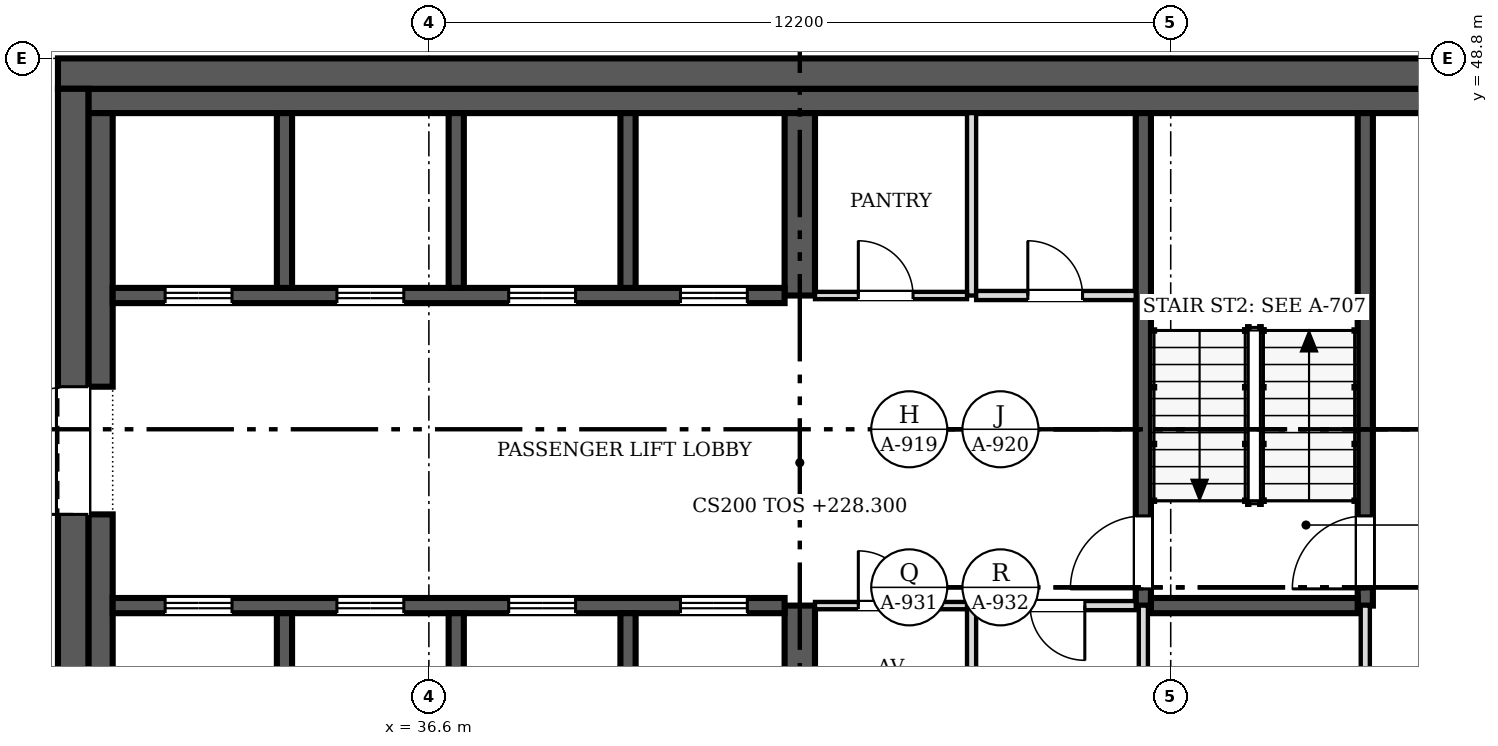
"""IFC4 building model, lengths in metres.
Left out: names, types, materials, properties, quantities, classifications, styles, units other than length and angle.
Written with IfcOpenShell. Run it as: python <this file> out.ifc"""

import sys

from ifc_helpers import new_model, si_unit, direction, frame, frame_2d, origin, place, context, subcontext, project, spatial, rectangle, extrude, source, transform, mapped, element, fill, save


model = new_model("IFC4")
c1 = context("Model", 3, precision=1e-05, world=origin(), true_north=direction((0.0, 1.0)))
c2 = subcontext(c1, "Body", "Model", "MODEL_VIEW")
j1 = project(units=[si_unit("LENGTHUNIT", "METRE"), si_unit("PLANEANGLEUNIT", "RADIAN")], contexts=[c1])
p1 = place(None, origin())
s1 = spatial("IfcSite", under=j1, at=p1, CompositionType="ELEMENT")
p2 = place(p1, origin())
s2 = spatial("IfcBuilding", under=s1, at=p2, CompositionType="ELEMENT")
p3 = place(p2, frame((0.0, 0.0, 228.3)))
s3 = spatial("IfcBuildingStorey", under=s2, at=p3, CompositionType="ELEMENT", Elevation=228.3)
p4 = place(p3, frame((30.75, 24.9, 0.0), z_axis=(0.0, 0.0, 1.0), x_axis=(0.0, 1.0, 0.0)))
e1 = element("IfcWall", 1, at=p4, inside=s3, PredefinedType="SHEAR", context=c2, shape_type="SweptSolid", body=[
    extrude(rectangle(XDim=23.4, YDim=0.5, at=frame_2d((11.7, 0.0))), origin(), (0.0, 0.0, 1.0), 3.8),
])
m1 = source(origin(), c2, "Body", "SweptSolid", [
    extrude(rectangle(XDim=2.1, YDim=2.4, at=frame_2d((1.05, 1.2))), frame((0.0, 0.26, 0.0), z_axis=(0.0, -1.0, 0.0), x_axis=(1.0, 0.0, 0.0)), (0.0, 0.0, 1.0), 0.52),
])
p5 = place(p4, frame((4.9, 0.0, 0.0)))
e2 = element("IfcOpeningElement", 2, at=p5, cuts=e1, PredefinedType="OPENING", context=c2, shape_type="MappedRepresentation", body=[
    mapped(m1, transform((0.0, 0.0, 0.0), scale=1.0)),
])
p6 = place(p4, frame((16.4, 0.0, 0.0)))
e3 = element("IfcOpeningElement", 3, at=p6, cuts=e1, PredefinedType="OPENING", context=c2, shape_type="MappedRepresentation", body=[
    mapped(m1, transform((0.0, 0.0, 0.0), scale=1.0)),
])
p7 = place(p3, frame((30.5, 48.55, 0.0), z_axis=(0.0, 0.0, 1.0), x_axis=(1.0, 0.0, 0.0)))
e4 = element("IfcWall", 4, at=p7, inside=s3, PredefinedType="SHEAR", context=c2, shape_type="SweptSolid", body=[
    extrude(rectangle(XDim=24.4, YDim=0.5, at=frame_2d((12.2, 0.0))), origin(), (0.0, 0.0, 1.0), 3.8),
])
p8 = place(p3, frame((31.0, 48.1, 0.0), z_axis=(0.0, 0.0, 1.0), x_axis=(1.0, 0.0, 0.0)))
e5 = element("IfcWall", 5, at=p8, inside=s3, PredefinedType="SOLIDWALL", context=c2, shape_type="SweptSolid", body=[
    extrude(rectangle(XDim=23.4, YDim=0.4, at=frame_2d((11.7, 0.0))), origin(), (0.0, 0.0, 1.0), 3.8),
])
p9 = place(p3, frame((31.2, 31.9, 0.0), z_axis=(0.0, 0.0, 1.0), x_axis=(0.0, 1.0, 0.0)))
e6 = element("IfcWall", 6, at=p9, inside=s3, PredefinedType="SOLIDWALL", context=c2, shape_type="SweptSolid", body=[
    extrude(rectangle(XDim=9.4, YDim=0.4, at=frame_2d((4.7, 0.0))), origin(), (0.0, 0.0, 1.0), 3.8),
])
p10 = place(p3, frame((31.2, 43.4, 0.0), z_axis=(0.0, 0.0, 1.0), x_axis=(0.0, 1.0, 0.0)))
e7 = element("IfcWall", 7, at=p10, inside=s3, PredefinedType="SOLIDWALL", context=c2, shape_type="SweptSolid", body=[
    extrude(rectangle(XDim=4.5, YDim=0.4, at=frame_2d((2.25, 0.0))), origin(), (0.0, 0.0, 1.0), 3.8),
])
p11 = place(p3, frame((42.7, 36.85, 0.0), z_axis=(0.0, 0.0, 1.0), x_axis=(0.0, 1.0, 0.0)))
e8 = element("IfcWall", 8, at=p11, inside=s3, PredefinedType="SHEAR", context=c2, shape_type="SweptSolid", body=[
    extrude(rectangle(XDim=2.95, YDim=0.5, at=frame_2d((1.475, 0.0))), origin(), (0.0, 0.0, 1.0), 3.8),
])
p12 = place(p3, frame((42.7, 44.9, 0.0), z_axis=(0.0, 0.0, 1.0), x_axis=(0.0, 1.0, 0.0)))
e9 = element("IfcWall", 9, at=p12, inside=s3, PredefinedType="SHEAR", context=c2, shape_type="SweptSolid", body=[
    extrude(rectangle(XDim=3.0, YDim=0.5, at=frame_2d((1.5, 0.0))), origin(), (0.0, 0.0, 1.0), 3.8),
])
p13 = place(p3, frame((31.4, 39.8, 0.0), z_axis=(0.0, 0.0, 1.0), x_axis=(1.0, 0.0, 0.0)))
e10 = element("IfcWall", 10, at=p13, inside=s3, PredefinedType="SOLIDWALL", context=c2, shape_type="SweptSolid", body=[
    extrude(rectangle(XDim=11.05, YDim=0.25, at=frame_2d((5.525, 0.0))), origin(), (0.0, 0.0, 1.0), 3.8),
])
m2 = source(origin(), c2, "Body", "SweptSolid", [
    extrude(rectangle(XDim=1.1, YDim=2.1, at=frame_2d((0.55, 1.05))), frame((0.0, 0.135, 0.0), z_axis=(0.0, -1.0, 0.0), x_axis=(1.0, 0.0, 0.0)), (0.0, 0.0, 1.0), 0.27),
])
p14 = place(p13, frame((0.863, 0.0, 0.0)))
e11 = element("IfcOpeningElement", 11, at=p14, cuts=e10, PredefinedType="OPENING", context=c2, shape_type="MappedRepresentation", body=[
    mapped(m2, transform((0.0, 0.0, 0.0), scale=1.0)),
])
p15 = place(p13, frame((3.688, 0.0, 0.0)))
e12 = element("IfcOpeningElement", 12, at=p15, cuts=e10, PredefinedType="OPENING", context=c2, shape_type="MappedRepresentation", body=[
    mapped(m2, transform((0.0, 0.0, 0.0), scale=1.0)),
])
p16 = place(p13, frame((6.512, 0.0, 0.0)))
e13 = element("IfcOpeningElement", 13, at=p16, cuts=e10, PredefinedType="OPENING", context=c2, shape_type="MappedRepresentation", body=[
    mapped(m2, transform((0.0, 0.0, 0.0), scale=1.0)),
])
p17 = place(p13, frame((9.337, 0.0, 0.0)))
e14 = element("IfcOpeningElement", 14, at=p17, cuts=e10, PredefinedType="OPENING", context=c2, shape_type="MappedRepresentation", body=[
    mapped(m2, transform((0.0, 0.0, 0.0), scale=1.0)),
])
p18 = place(p3, frame((42.45, 44.9, 0.0), z_axis=(0.0, 0.0, 1.0), x_axis=(-1.0, 0.0, 0.0)))
e15 = element("IfcWall", 15, at=p18, inside=s3, PredefinedType="SOLIDWALL", context=c2, shape_type="SweptSolid", body=[
    extrude(rectangle(XDim=11.05, YDim=0.25, at=frame_2d((5.525, 0.0))), origin(), (0.0, 0.0, 1.0), 3.8),
])
p19 = place(p18, frame((9.087, 0.0, 0.0)))
e16 = element("IfcOpeningElement", 16, at=p19, cuts=e15, PredefinedType="OPENING", context=c2, shape_type="MappedRepresentation", body=[
    mapped(m2, transform((0.0, 0.0, 0.0), scale=1.0)),
])
p20 = place(p18, frame((6.262, 0.0, 0.0)))
e17 = element("IfcOpeningElement", 17, at=p20, cuts=e15, PredefinedType="OPENING", context=c2, shape_type="MappedRepresentation", body=[
    mapped(m2, transform((0.0, 0.0, 0.0), scale=1.0)),
])
p21 = place(p18, frame((3.438, 0.0, 0.0)))
e18 = element("IfcOpeningElement", 18, at=p21, cuts=e15, PredefinedType="OPENING", context=c2, shape_type="MappedRepresentation", body=[
    mapped(m2, transform((0.0, 0.0, 0.0), scale=1.0)),
])
p22 = place(p18, frame((0.613, 0.0, 0.0)))
e19 = element("IfcOpeningElement", 19, at=p22, cuts=e15, PredefinedType="OPENING", context=c2, shape_type="MappedRepresentation", body=[
    mapped(m2, transform((0.0, 0.0, 0.0), scale=1.0)),
])
p23 = place(p3, frame((48.35, 47.9, 0.0), z_axis=(0.0, 0.0, 1.0), x_axis=(0.0, -1.0, 0.0)))
e20 = element("IfcWall", 20, at=p23, inside=s3, PredefinedType="SOLIDWALL", context=c2, shape_type="SweptSolid", body=[
    extrude(rectangle(XDim=8.1, YDim=0.25, at=frame_2d((4.05, 0.0))), origin(), (0.0, 0.0, 1.0), 3.8),
])
m3 = source(origin(), c2, "Body", "SweptSolid", [
    extrude(rectangle(XDim=1.2, YDim=2.1, at=frame_2d((0.6, 1.05))), frame((0.0, 0.135, 0.0), z_axis=(0.0, -1.0, 0.0), x_axis=(1.0, 0.0, 0.0)), (0.0, 0.0, 1.0), 0.27),
])
p24 = place(p23, frame((6.625, 0.0, 0.0)))
e21 = element("IfcOpeningElement", 21, at=p24, cuts=e20, PredefinedType="OPENING", context=c2, shape_type="MappedRepresentation", body=[
    mapped(m3, transform((0.0, 0.0, 0.0), scale=1.0)),
])
p25 = place(p3, frame((52.0, 39.8, 0.0), z_axis=(0.0, 0.0, 1.0), x_axis=(0.0, 1.0, 0.0)))
e22 = element("IfcWall", 22, at=p25, inside=s3, PredefinedType="SOLIDWALL", context=c2, shape_type="SweptSolid", body=[
    extrude(rectangle(XDim=8.1, YDim=0.25, at=frame_2d((4.05, 0.0))), origin(), (0.0, 0.0, 1.0), 3.8),
])
p26 = place(p25, frame((0.275, 0.0, 0.0)))
e23 = element("IfcOpeningElement", 23, at=p26, cuts=e22, PredefinedType="OPENING", context=c2, shape_type="MappedRepresentation", body=[
    mapped(m3, transform((0.0, 0.0, 0.0), scale=1.0)),
])
p27 = place(p3, frame((48.475, 39.8, 0.0), z_axis=(0.0, 0.0, 1.0), x_axis=(1.0, 0.0, 0.0)))
e24 = element("IfcWall", 24, at=p27, inside=s3, PredefinedType="SOLIDWALL", context=c2, shape_type="SweptSolid", body=[
    extrude(rectangle(XDim=3.4, YDim=0.25, at=frame_2d((1.7, 0.0))), origin(), (0.0, 0.0, 1.0), 3.8),
])
for number, where, z_axis, x_axis in (
    (25, (34.225, 36.85, 0.0), (0.0, 0.0, 1.0), (0.0, 1.0, 0.0)),
    (26, (37.05, 36.85, 0.0), (0.0, 0.0, 1.0), (0.0, 1.0, 0.0)),
    (27, (39.875, 36.85, 0.0), (0.0, 0.0, 1.0), (0.0, 1.0, 0.0)),
):
    element("IfcWall", number, at=place(p3, frame(where, z_axis=z_axis, x_axis=x_axis)), inside=s3, PredefinedType="SOLIDWALL", context=c2, shape_type="SweptSolid", body=[
        extrude(rectangle(XDim=2.825, YDim=0.25, at=frame_2d((1.413, 0.0))), origin(), (0.0, 0.0, 1.0), 3.8),
    ])
for number, where, z_axis, x_axis in (
    (28, (34.225, 45.025, 0.0), (0.0, 0.0, 1.0), (0.0, 1.0, 0.0)),
    (29, (37.05, 45.025, 0.0), (0.0, 0.0, 1.0), (0.0, 1.0, 0.0)),
    (30, (39.875, 45.025, 0.0), (0.0, 0.0, 1.0), (0.0, 1.0, 0.0)),
):
    element("IfcWall", number, at=place(p3, frame(where, z_axis=z_axis, x_axis=x_axis)), inside=s3, PredefinedType="SOLIDWALL", context=c2, shape_type="SweptSolid", body=[
        extrude(rectangle(XDim=2.875, YDim=0.25, at=frame_2d((1.438, 0.0))), origin(), (0.0, 0.0, 1.0), 3.8),
    ])
p28 = place(p3, frame((52.0, 33.525, 0.0), z_axis=(0.0, 0.0, 1.0), x_axis=(0.0, 1.0, 0.0)))
e31 = element("IfcWall", 31, at=p28, inside=s3, PredefinedType="PARTITIONING", context=c2, shape_type="SweptSolid", body=[
    extrude(rectangle(XDim=6.275, YDim=0.15, at=frame_2d((3.138, 0.0))), origin(), (0.0, 0.0, 1.0), 3.5),
])
m4 = source(origin(), c2, "Body", "SweptSolid", [
    extrude(rectangle(XDim=0.9, YDim=2.1, at=frame_2d((0.45, 1.05))), frame((0.0, 0.085, 0.0), z_axis=(0.0, -1.0, 0.0), x_axis=(1.0, 0.0, 0.0)), (0.0, 0.0, 1.0), 0.17),
])
p29 = place(p28, frame((1.025, 0.0, 0.0)))
e32 = element("IfcOpeningElement", 32, at=p29, cuts=e31, PredefinedType="OPENING", context=c2, shape_type="MappedRepresentation", body=[
    mapped(m4, transform((0.0, 0.0, 0.0), scale=1.0)),
])
for number, where, z_axis, x_axis in (
    (33, (45.525, 36.85, 0.0), (0.0, 0.0, 1.0), (0.0, 1.0, 0.0)),
    (34, (48.35, 36.85, 0.0), (0.0, 0.0, 1.0), (0.0, 1.0, 0.0)),
):
    element("IfcWall", number, at=place(p3, frame(where, z_axis=z_axis, x_axis=x_axis)), inside=s3, PredefinedType="PARTITIONING", context=c2, shape_type="SweptSolid", body=[
        extrude(rectangle(XDim=2.95, YDim=0.15, at=frame_2d((1.475, 0.0))), origin(), (0.0, 0.0, 1.0), 3.5),
    ])
p30 = place(p3, frame((45.525, 44.9, 0.0), z_axis=(0.0, 0.0, 1.0), x_axis=(0.0, 1.0, 0.0)))
e35 = element("IfcWall", 35, at=p30, inside=s3, PredefinedType="PARTITIONING", context=c2, shape_type="SweptSolid", body=[
    extrude(rectangle(XDim=3.0, YDim=0.15, at=frame_2d((1.5, 0.0))), origin(), (0.0, 0.0, 1.0), 3.5),
])
p31 = place(p3, frame((45.45, 39.8, 0.0), z_axis=(0.0, 0.0, 1.0), x_axis=(-1.0, 0.0, 0.0)))
e36 = element("IfcWall", 36, at=p31, inside=s3, PredefinedType="PARTITIONING", context=c2, shape_type="SweptSolid", body=[
    extrude(rectangle(XDim=2.5, YDim=0.12, at=frame_2d((1.25, 0.0))), origin(), (0.0, 0.0, 1.0), 3.5),
])
m5 = source(origin(), c2, "Body", "SweptSolid", [
    extrude(rectangle(XDim=0.9, YDim=2.1, at=frame_2d((0.45, 1.05))), frame((0.0, 0.07, 0.0), z_axis=(0.0, -1.0, 0.0), x_axis=(1.0, 0.0, 0.0)), (0.0, 0.0, 1.0), 0.14),
])
p32 = place(p31, frame((0.887, 0.0, 0.0)))
e37 = element("IfcOpeningElement", 37, at=p32, cuts=e36, PredefinedType="OPENING", context=c2, shape_type="MappedRepresentation", body=[
    mapped(m5, transform((0.0, 0.0, 0.0), scale=1.0)),
])
p33 = place(p3, frame((48.225, 39.8, 0.0), z_axis=(0.0, 0.0, 1.0), x_axis=(-1.0, 0.0, 0.0)))
e38 = element("IfcWall", 38, at=p33, inside=s3, PredefinedType="PARTITIONING", context=c2, shape_type="SweptSolid", body=[
    extrude(rectangle(XDim=2.625, YDim=0.15, at=frame_2d((1.312, 0.0))), origin(), (0.0, 0.0, 1.0), 3.5),
])
p34 = place(p33, frame((0.837, 0.0, 0.0)))
e39 = element("IfcOpeningElement", 39, at=p34, cuts=e38, PredefinedType="OPENING", context=c2, shape_type="MappedRepresentation", body=[
    mapped(m4, transform((0.0, 0.0, 0.0), scale=1.0)),
])
p35 = place(p3, frame((42.95, 44.9, 0.0), z_axis=(0.0, 0.0, 1.0), x_axis=(1.0, 0.0, 0.0)))
e40 = element("IfcWall", 40, at=p35, inside=s3, PredefinedType="PARTITIONING", context=c2, shape_type="SweptSolid", body=[
    extrude(rectangle(XDim=2.5, YDim=0.12, at=frame_2d((1.25, 0.0))), origin(), (0.0, 0.0, 1.0), 3.5),
])
p36 = place(p35, frame((0.712, 0.0, 0.0)))
e41 = element("IfcOpeningElement", 41, at=p36, cuts=e40, PredefinedType="OPENING", context=c2, shape_type="MappedRepresentation", body=[
    mapped(m5, transform((0.0, 0.0, 0.0), scale=1.0)),
])
p37 = place(p3, frame((45.6, 44.9, 0.0), z_axis=(0.0, 0.0, 1.0), x_axis=(1.0, 0.0, 0.0)))
e42 = element("IfcWall", 42, at=p37, inside=s3, PredefinedType="PARTITIONING", context=c2, shape_type="SweptSolid", body=[
    extrude(rectangle(XDim=2.625, YDim=0.15, at=frame_2d((1.312, 0.0))), origin(), (0.0, 0.0, 1.0), 3.5),
])
p38 = place(p37, frame((0.85, 0.0, 0.0)))
e43 = element("IfcOpeningElement", 43, at=p38, cuts=e42, PredefinedType="OPENING", context=c2, shape_type="MappedRepresentation", body=[
    mapped(m4, transform((0.0, 0.0, 0.0), scale=1.0)),
])
m6 = source(origin(), c2, "Body", "SweptSolid", [
    extrude(rectangle(XDim=2.1, YDim=2.4, at=frame_2d((1.05, 1.2))), frame((0.0, 0.025, 0.0), z_axis=(0.0, -1.0, 0.0), x_axis=(1.0, 0.0, 0.0)), (0.0, 0.0, 1.0), 0.05),
])
p39 = place(p6, origin())
e44 = element("IfcDoor", 44, at=p39, inside=s3, OperationType="DOUBLE_DOOR_SINGLE_SWING", PredefinedType="DOOR", context=c2, shape_type="MappedRepresentation", body=[
    mapped(m6, transform((0.0, 0.0, 0.0), scale=1.0)),
])
fill(e3, e44)
m7 = source(origin(), c2, "Body", "SweptSolid", [
    extrude(rectangle(XDim=1.1, YDim=2.1, at=frame_2d((0.55, 1.05))), frame((0.0, 0.025, 0.0), z_axis=(0.0, -1.0, 0.0), x_axis=(1.0, 0.0, 0.0)), (0.0, 0.0, 1.0), 0.05),
])
p40 = place(p14, origin())
e45 = element("IfcDoor", 45, at=p40, inside=s3, OperationType="DOUBLE_DOOR_SLIDING", PredefinedType="DOOR", context=c2, shape_type="MappedRepresentation", body=[
    mapped(m7, transform((0.0, 0.0, 0.0), scale=1.0)),
])
fill(e11, e45)
p41 = place(p15, origin())
e46 = element("IfcDoor", 46, at=p41, inside=s3, OperationType="DOUBLE_DOOR_SLIDING", PredefinedType="DOOR", context=c2, shape_type="MappedRepresentation", body=[
    mapped(m7, transform((0.0, 0.0, 0.0), scale=1.0)),
])
fill(e12, e46)
p42 = place(p16, origin())
e47 = element("IfcDoor", 47, at=p42, inside=s3, OperationType="DOUBLE_DOOR_SLIDING", PredefinedType="DOOR", context=c2, shape_type="MappedRepresentation", body=[
    mapped(m7, transform((0.0, 0.0, 0.0), scale=1.0)),
])
fill(e13, e47)
p43 = place(p17, origin())
e48 = element("IfcDoor", 48, at=p43, inside=s3, OperationType="DOUBLE_DOOR_SLIDING", PredefinedType="DOOR", context=c2, shape_type="MappedRepresentation", body=[
    mapped(m7, transform((0.0, 0.0, 0.0), scale=1.0)),
])
fill(e14, e48)
p44 = place(p19, origin())
e49 = element("IfcDoor", 49, at=p44, inside=s3, OperationType="DOUBLE_DOOR_SLIDING", PredefinedType="DOOR", context=c2, shape_type="MappedRepresentation", body=[
    mapped(m7, transform((0.0, 0.0, 0.0), scale=1.0)),
])
fill(e16, e49)
p45 = place(p20, origin())
e50 = element("IfcDoor", 50, at=p45, inside=s3, OperationType="DOUBLE_DOOR_SLIDING", PredefinedType="DOOR", context=c2, shape_type="MappedRepresentation", body=[
    mapped(m7, transform((0.0, 0.0, 0.0), scale=1.0)),
])
fill(e17, e50)
p46 = place(p21, origin())
e51 = element("IfcDoor", 51, at=p46, inside=s3, OperationType="DOUBLE_DOOR_SLIDING", PredefinedType="DOOR", context=c2, shape_type="MappedRepresentation", body=[
    mapped(m7, transform((0.0, 0.0, 0.0), scale=1.0)),
])
fill(e18, e51)
p47 = place(p22, origin())
e52 = element("IfcDoor", 52, at=p47, inside=s3, OperationType="DOUBLE_DOOR_SLIDING", PredefinedType="DOOR", context=c2, shape_type="MappedRepresentation", body=[
    mapped(m7, transform((0.0, 0.0, 0.0), scale=1.0)),
])
fill(e19, e52)
m8 = source(origin(), c2, "Body", "SweptSolid", [
    extrude(rectangle(XDim=1.2, YDim=2.1, at=frame_2d((0.6, 1.05))), frame((0.0, 0.025, 0.0), z_axis=(0.0, -1.0, 0.0), x_axis=(1.0, 0.0, 0.0)), (0.0, 0.0, 1.0), 0.05),
])
p48 = place(p24, origin())
e53 = element("IfcDoor", 53, at=p48, inside=s3, OperationType="SINGLE_SWING_RIGHT", PredefinedType="DOOR", context=c2, shape_type="MappedRepresentation", body=[
    mapped(m8, transform((0.0, 0.0, 0.0), scale=1.0)),
])
fill(e21, e53)
p49 = place(p26, origin())
e54 = element("IfcDoor", 54, at=p49, inside=s3, OperationType="SINGLE_SWING_LEFT", PredefinedType="DOOR", context=c2, shape_type="MappedRepresentation", body=[
    mapped(m8, transform((0.0, 0.0, 0.0), scale=1.0)),
])
fill(e23, e54)
m9 = source(origin(), c2, "Body", "SweptSolid", [
    extrude(rectangle(XDim=0.9, YDim=2.1, at=frame_2d((0.45, 1.05))), frame((0.0, 0.025, 0.0), z_axis=(0.0, -1.0, 0.0), x_axis=(1.0, 0.0, 0.0)), (0.0, 0.0, 1.0), 0.05),
])
p50 = place(p32, origin())
e55 = element("IfcDoor", 55, at=p50, inside=s3, OperationType="SINGLE_SWING_RIGHT", PredefinedType="DOOR", context=c2, shape_type="MappedRepresentation", body=[
    mapped(m9, transform((0.0, 0.0, 0.0), scale=1.0)),
])
fill(e37, e55)
p51 = place(p34, origin())
e56 = element("IfcDoor", 56, at=p51, inside=s3, OperationType="SINGLE_SWING_LEFT", PredefinedType="DOOR", context=c2, shape_type="MappedRepresentation", body=[
    mapped(m9, transform((0.0, 0.0, 0.0), scale=1.0)),
])
fill(e39, e56)
p52 = place(p36, origin())
e57 = element("IfcDoor", 57, at=p52, inside=s3, OperationType="SINGLE_SWING_LEFT", PredefinedType="DOOR", context=c2, shape_type="MappedRepresentation", body=[
    mapped(m9, transform((0.0, 0.0, 0.0), scale=1.0)),
])
fill(e41, e57)
p53 = place(p38, origin())
e58 = element("IfcDoor", 58, at=p53, inside=s3, OperationType="SINGLE_SWING_LEFT", PredefinedType="DOOR", context=c2, shape_type="MappedRepresentation", body=[
    mapped(m9, transform((0.0, 0.0, 0.0), scale=1.0)),
])
fill(e43, e58)
save(model, sys.argv[1])
